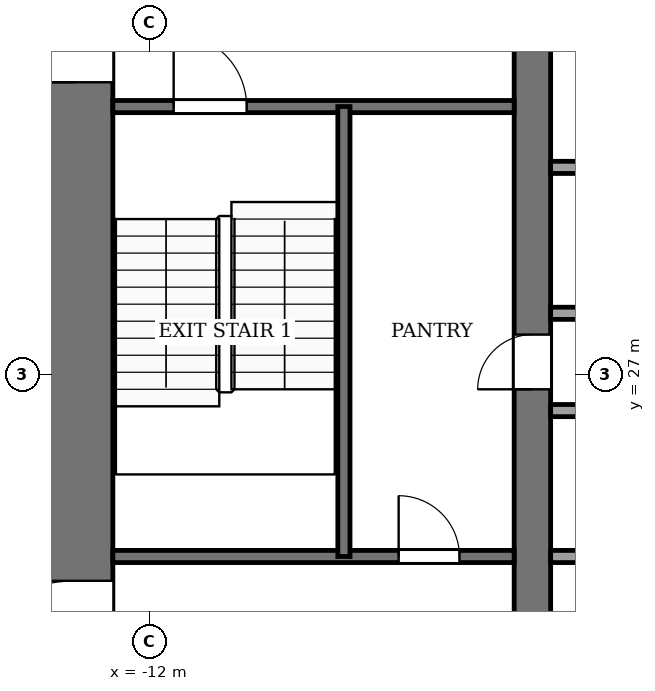
"""IFC4 building model, lengths in metres.
Left out: names, types, materials, properties, quantities, classifications, styles, units other than length and angle.
Written with IfcOpenShell. Run it as: python <this file> out.ifc"""

import sys

from ifc_helpers import new_model, si_unit, direction, frame, frame_2d, origin, place, context, subcontext, project, spatial, rectangle, extrude, element, fill, save


model = new_model("IFC4")
c1 = context("Model", 3, precision=1e-05, world=origin(), true_north=direction((0.0, 1.0)))
c2 = subcontext(c1, "Body", "Model", "MODEL_VIEW")
j1 = project(units=[si_unit("LENGTHUNIT", "METRE"), si_unit("PLANEANGLEUNIT", "RADIAN")], contexts=[c1])
p1 = place(None, origin())
s1 = spatial("IfcSite", under=j1, at=p1, CompositionType="ELEMENT")
p2 = place(p1, origin())
s2 = spatial("IfcBuilding", under=s1, at=p2, CompositionType="ELEMENT")
p3 = place(p2, frame((0.0, 0.0, 82.0)))
s3 = spatial("IfcBuildingStorey", under=s2, at=p3, CompositionType="ELEMENT", Elevation=82.0)
p4 = place(p3, frame((-13.2, 18.4, -0.13), z_axis=(0.0, 0.0, 1.0), x_axis=(0.0, 1.0, 0.0)))
e1 = element("IfcWall", 1, at=p4, inside=s3, PredefinedType="SHEAR", context=c2, shape_type="SweptSolid", body=[
    extrude(rectangle(XDim=19.2, YDim=1.2, at=frame_2d((9.6, 0.0))), origin(), (0.0, 0.0, 1.0), 4.0),
])
p5 = place(p4, frame((2.8, 0.0, 0.13)))
e2 = element("IfcOpeningElement", 2, at=p5, cuts=e1, PredefinedType="OPENING", context=c2, shape_type="SweptSolid", body=[
    extrude(rectangle(XDim=2.4, YDim=2.4, at=frame_2d((1.2, 1.2))), frame((0.0, 0.61, 0.0), z_axis=(0.0, -1.0, 0.0), x_axis=(1.0, 0.0, 0.0)), (0.0, 0.0, 1.0), 1.22),
])
p6 = place(p4, frame((13.4, 0.0, 0.13)))
e3 = element("IfcOpeningElement", 3, at=p6, cuts=e1, PredefinedType="OPENING", context=c2, shape_type="SweptSolid", body=[
    extrude(rectangle(XDim=1.4, YDim=2.2, at=frame_2d((0.7, 1.1))), frame((0.0, 0.61, 0.0), z_axis=(0.0, -1.0, 0.0), x_axis=(1.0, 0.0, 0.0)), (0.0, 0.0, 1.0), 1.22),
])
p7 = place(p3, frame((-5.7, 18.4, -0.13), z_axis=(0.0, 0.0, 1.0), x_axis=(0.0, 1.0, 0.0)))
e4 = element("IfcWall", 4, at=p7, inside=s3, PredefinedType="SHEAR", context=c2, shape_type="SweptSolid", body=[
    extrude(rectangle(XDim=19.2, YDim=0.6, at=frame_2d((9.6, 0.0))), origin(), (0.0, 0.0, 1.0), 4.0),
])
p8 = place(p7, frame((8.35, 0.0, 0.13)))
e5 = element("IfcOpeningElement", 5, at=p8, cuts=e4, PredefinedType="OPENING", context=c2, shape_type="SweptSolid", body=[
    extrude(rectangle(XDim=0.9, YDim=2.1, at=frame_2d((0.45, 1.05))), frame((0.0, 0.31, 0.0), z_axis=(0.0, -1.0, 0.0), x_axis=(1.0, 0.0, 0.0)), (0.0, 0.0, 1.0), 0.62),
])
p9 = place(p3, frame((-12.6, 24.0, 0.0), z_axis=(0.0, 0.0, 1.0), x_axis=(1.0, 0.0, 0.0)))
e6 = element("IfcWall", 6, at=p9, inside=s3, PredefinedType="PARTITIONING", context=c2, shape_type="SweptSolid", body=[
    extrude(rectangle(XDim=6.6, YDim=0.2, at=frame_2d((3.3, 0.0))), origin(), (0.0, 0.0, 1.0), 3.87),
])
p10 = place(p9, frame((4.7, 0.0, 0.0)))
e7 = element("IfcOpeningElement", 7, at=p10, cuts=e6, PredefinedType="OPENING", context=c2, shape_type="SweptSolid", body=[
    extrude(rectangle(XDim=1.0, YDim=2.1, at=frame_2d((0.5, 1.05))), frame((0.0, 0.11, 0.0), z_axis=(0.0, -1.0, 0.0), x_axis=(1.0, 0.0, 0.0)), (0.0, 0.0, 1.0), 0.22),
])
p11 = place(p3, frame((-5.4, 24.0, 0.0), z_axis=(0.0, 0.0, 1.0), x_axis=(1.0, 0.0, 0.0)))
e8 = element("IfcWall", 8, at=p11, inside=s3, PredefinedType="PARTITIONING", context=c2, shape_type="SweptSolid", body=[
    extrude(rectangle(XDim=10.8, YDim=0.2, at=frame_2d((5.4, 0.0))), origin(), (0.0, 0.0, 1.0), 3.87),
])
p12 = place(p11, frame((0.75, 0.0, 0.0)))
e9 = element("IfcOpeningElement", 9, at=p12, cuts=e8, PredefinedType="OPENING", context=c2, shape_type="SweptSolid", body=[
    extrude(rectangle(XDim=1.2, YDim=2.2, at=frame_2d((0.6, 1.1))), frame((0.0, 0.11, 0.0), z_axis=(0.0, -1.0, 0.0), x_axis=(1.0, 0.0, 0.0)), (0.0, 0.0, 1.0), 0.22),
])
p13 = place(p11, frame((3.45, 0.0, 0.0)))
e10 = element("IfcOpeningElement", 10, at=p13, cuts=e8, PredefinedType="OPENING", context=c2, shape_type="SweptSolid", body=[
    extrude(rectangle(XDim=1.2, YDim=2.2, at=frame_2d((0.6, 1.1))), frame((0.0, 0.11, 0.0), z_axis=(0.0, -1.0, 0.0), x_axis=(1.0, 0.0, 0.0)), (0.0, 0.0, 1.0), 0.22),
])
p14 = place(p11, frame((6.15, 0.0, 0.0)))
e11 = element("IfcOpeningElement", 11, at=p14, cuts=e8, PredefinedType="OPENING", context=c2, shape_type="SweptSolid", body=[
    extrude(rectangle(XDim=1.2, YDim=2.2, at=frame_2d((0.6, 1.1))), frame((0.0, 0.11, 0.0), z_axis=(0.0, -1.0, 0.0), x_axis=(1.0, 0.0, 0.0)), (0.0, 0.0, 1.0), 0.22),
])
p15 = place(p11, frame((8.85, 0.0, 0.0)))
e12 = element("IfcOpeningElement", 12, at=p15, cuts=e8, PredefinedType="OPENING", context=c2, shape_type="SweptSolid", body=[
    extrude(rectangle(XDim=1.2, YDim=2.2, at=frame_2d((0.6, 1.1))), frame((0.0, 0.11, 0.0), z_axis=(0.0, -1.0, 0.0), x_axis=(1.0, 0.0, 0.0)), (0.0, 0.0, 1.0), 0.22),
])
for number, where, z_axis, x_axis in (
    (13, (-5.4, 26.4, 0.0), (0.0, 0.0, 1.0), (1.0, 0.0, 0.0)),
    (14, (-5.4, 28.0, 0.0), (0.0, 0.0, 1.0), (1.0, 0.0, 0.0)),
    (15, (-5.4, 30.4, 0.0), (0.0, 0.0, 1.0), (1.0, 0.0, 0.0)),
):
    element("IfcWall", number, at=place(p3, frame(where, z_axis=z_axis, x_axis=x_axis)), inside=s3, PredefinedType="PARTITIONING", context=c2, shape_type="SweptSolid", body=[
        extrude(rectangle(XDim=10.8, YDim=0.2, at=frame_2d((5.4, 0.0))), origin(), (0.0, 0.0, 1.0), 3.87),
    ])
p16 = place(p3, frame((-12.6, 31.4, 0.0), z_axis=(0.0, 0.0, 1.0), x_axis=(1.0, 0.0, 0.0)))
e16 = element("IfcWall", 16, at=p16, inside=s3, PredefinedType="PARTITIONING", context=c2, shape_type="SweptSolid", body=[
    extrude(rectangle(XDim=6.6, YDim=0.2, at=frame_2d((3.3, 0.0))), origin(), (0.0, 0.0, 1.0), 3.87),
])
p17 = place(p16, frame((1.0, 0.0, 0.0)))
e17 = element("IfcOpeningElement", 17, at=p17, cuts=e16, PredefinedType="OPENING", context=c2, shape_type="SweptSolid", body=[
    extrude(rectangle(XDim=1.2, YDim=2.2, at=frame_2d((0.6, 1.1))), frame((0.0, 0.11, 0.0), z_axis=(0.0, -1.0, 0.0), x_axis=(1.0, 0.0, 0.0)), (0.0, 0.0, 1.0), 0.22),
])
p18 = place(p3, frame((-8.8, 24.0, 0.0), z_axis=(0.0, 0.0, 1.0), x_axis=(0.0, 1.0, 0.0)))
e18 = element("IfcWall", 18, at=p18, inside=s3, PredefinedType="PARTITIONING", context=c2, shape_type="SweptSolid", body=[
    extrude(rectangle(XDim=7.4, YDim=0.2, at=frame_2d((3.7, 0.0))), origin(), (0.0, 0.0, 1.0), 3.87),
])
p19 = place(p10, origin())
e19 = element("IfcDoor", 19, at=p19, inside=s3, OperationType="SINGLE_SWING_RIGHT", PredefinedType="DOOR", context=c2, shape_type="SweptSolid", body=[
    extrude(rectangle(XDim=1.0, YDim=2.1, at=frame_2d((0.5, 1.05))), frame((0.0, 0.025, 0.0), z_axis=(0.0, -1.0, 0.0), x_axis=(1.0, 0.0, 0.0)), (0.0, 0.0, 1.0), 0.05),
])
fill(e7, e19)
p20 = place(p8, origin())
e20 = element("IfcDoor", 20, at=p20, inside=s3, OperationType="SINGLE_SWING_RIGHT", PredefinedType="DOOR", context=c2, shape_type="SweptSolid", body=[
    extrude(rectangle(XDim=0.9, YDim=2.1, at=frame_2d((0.45, 1.05))), frame((0.0, 0.025, 0.0), z_axis=(0.0, -1.0, 0.0), x_axis=(1.0, 0.0, 0.0)), (0.0, 0.0, 1.0), 0.05),
])
fill(e5, e20)
p21 = place(p17, origin())
e21 = element("IfcDoor", 21, at=p21, inside=s3, OperationType="SINGLE_SWING_RIGHT", PredefinedType="DOOR", context=c2, shape_type="SweptSolid", body=[
    extrude(rectangle(XDim=1.2, YDim=2.2, at=frame_2d((0.6, 1.1))), frame((0.0, 0.025, 0.0), z_axis=(0.0, -1.0, 0.0), x_axis=(1.0, 0.0, 0.0)), (0.0, 0.0, 1.0), 0.05),
])
fill(e17, e21)
p22 = place(p5, origin())
e22 = element("IfcDoor", 22, at=p22, inside=s3, OperationType="DOUBLE_DOOR_SINGLE_SWING", PredefinedType="DOOR", context=c2, shape_type="SweptSolid", body=[
    extrude(rectangle(XDim=2.4, YDim=2.4, at=frame_2d((1.2, 1.2))), frame((0.0, 0.025, 0.0), z_axis=(0.0, -1.0, 0.0), x_axis=(1.0, 0.0, 0.0)), (0.0, 0.0, 1.0), 0.05),
])
fill(e2, e22)
p23 = place(p6, origin())
e23 = element("IfcDoor", 23, at=p23, inside=s3, OperationType="SINGLE_SWING_RIGHT", PredefinedType="DOOR", context=c2, shape_type="SweptSolid", body=[
    extrude(rectangle(XDim=1.4, YDim=2.2, at=frame_2d((0.7, 1.1))), frame((0.0, 0.025, 0.0), z_axis=(0.0, -1.0, 0.0), x_axis=(1.0, 0.0, 0.0)), (0.0, 0.0, 1.0), 0.05),
])
fill(e3, e23)
save(model, sys.argv[1])
